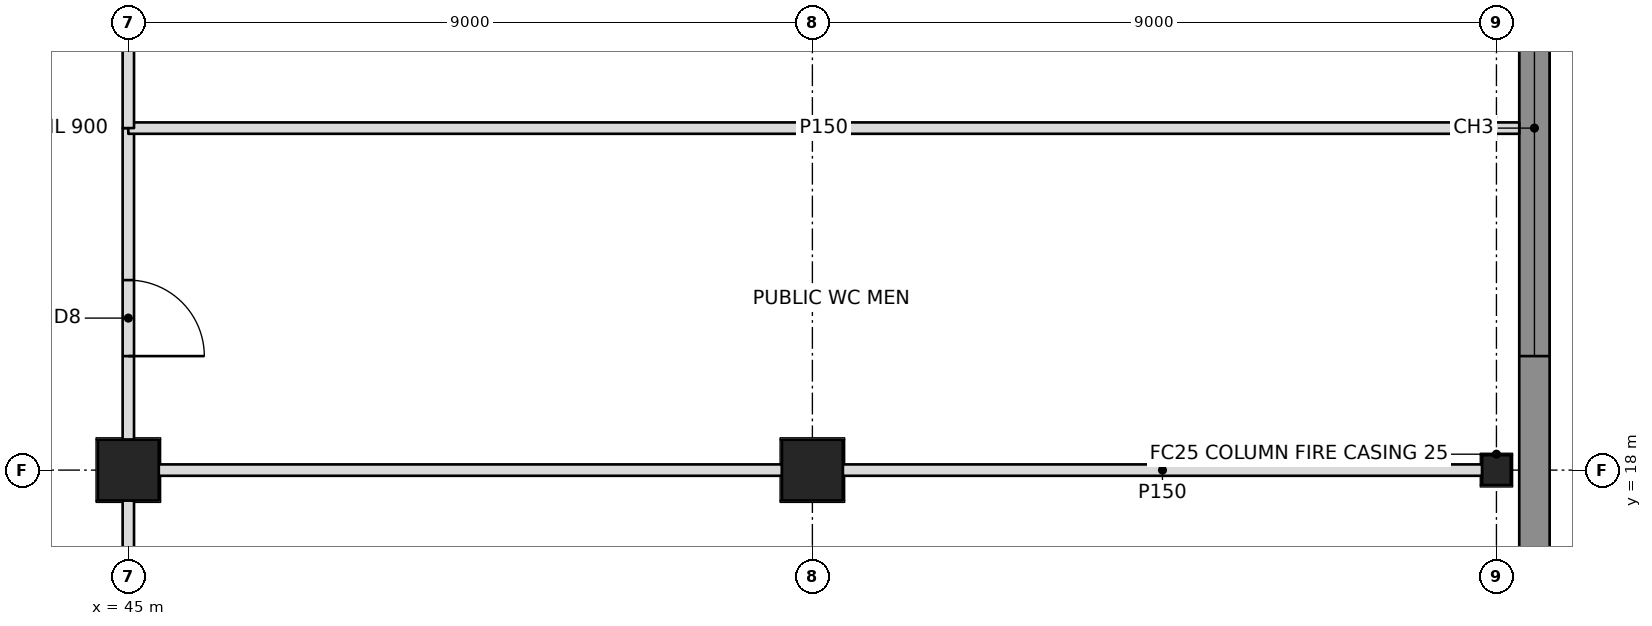
"""IFC4 building model, lengths in metres.
Left out: names, types, materials, properties, quantities, classifications, styles, units other than length and angle.
Written with IfcOpenShell. Run it as: python <this file> out.ifc"""

import sys

from ifc_helpers import new_model, si_unit, direction, frame, frame_2d, origin, origin_2d, place, context, subcontext, project, spatial, rectangle, hollow_rectangle, i_section, extrude, element, fill, save


model = new_model("IFC4")
c1 = context("Model", 3, precision=1e-05, world=origin(), true_north=direction((0.0, 1.0)))
c2 = subcontext(c1, "Body", "Model", "MODEL_VIEW")
j1 = project(units=[si_unit("LENGTHUNIT", "METRE"), si_unit("PLANEANGLEUNIT", "RADIAN")], contexts=[c1])
p1 = place(None, origin())
s1 = spatial("IfcSite", under=j1, at=p1, CompositionType="ELEMENT")
p2 = place(p1, origin())
s2 = spatial("IfcBuilding", under=s1, at=p2, CompositionType="ELEMENT")
p3 = place(p2, frame((0.0, 0.0, 11.0)))
s3 = spatial("IfcBuildingStorey", under=s2, at=p3, CompositionType="ELEMENT", Elevation=11.0)
for number, where, z_axis, x_axis in (
    (1, (45.0, 18.0, 0.0), (0.0, 0.0, 1.0), (0.0, 1.0, 0.0)),
    (2, (54.0, 18.0, 0.0), (0.0, 0.0, 1.0), (0.0, 1.0, 0.0)),
):
    element("IfcColumn", number, at=place(p3, frame(where, z_axis=z_axis, x_axis=x_axis)), inside=s3, PredefinedType="COLUMN", context=c2, shape_type="SweptSolid", body=[
        extrude(hollow_rectangle(XDim=0.8, YDim=0.8, WallThickness=0.1, at=origin_2d()), origin(), (0.0, 0.0, 1.0), 5.0),
    ])
p4 = place(p3, frame((63.0, 18.0, 0.0), z_axis=(0.0, 0.0, 1.0), x_axis=(0.0, 1.0, 0.0)))
e3 = element("IfcColumn", 3, at=p4, inside=s3, PredefinedType="COLUMN", context=c2, shape_type="SweptSolid", body=[
    extrude(i_section(OverallWidth=0.394, OverallDepth=0.376, WebThickness=0.017, FlangeThickness=0.028, at=origin_2d()), origin(), (0.0, 0.0, 1.0), 5.0),
])
p5 = place(p3, frame((63.5, -27.5, 0.0), z_axis=(0.0, 0.0, 1.0), x_axis=(0.0, 1.0, 0.0)))
e4 = element("IfcWall", 4, at=p5, inside=s3, PredefinedType="SOLIDWALL", context=c2, shape_type="SweptSolid", body=[
    extrude(rectangle(XDim=73.0, YDim=0.4, at=frame_2d((36.5, 0.0))), origin(), (0.0, 0.0, 1.0), 4.75),
])
p6 = place(p5, frame((2.0, 0.0, 0.9)))
e5 = element("IfcOpeningElement", 5, at=p6, cuts=e4, PredefinedType="OPENING", context=c2, shape_type="SweptSolid", body=[
    extrude(rectangle(XDim=6.0, YDim=2.6, at=frame_2d((3.0, 1.3))), frame((0.0, 0.21, 0.0), z_axis=(0.0, -1.0, 0.0), x_axis=(1.0, 0.0, 0.0)), (0.0, 0.0, 1.0), 0.42),
])
p7 = place(p5, frame((11.0, 0.0, 0.9)))
e6 = element("IfcOpeningElement", 6, at=p7, cuts=e4, PredefinedType="OPENING", context=c2, shape_type="SweptSolid", body=[
    extrude(rectangle(XDim=6.0, YDim=2.6, at=frame_2d((3.0, 1.3))), frame((0.0, 0.21, 0.0), z_axis=(0.0, -1.0, 0.0), x_axis=(1.0, 0.0, 0.0)), (0.0, 0.0, 1.0), 0.42),
])
p8 = place(p5, frame((20.0, 0.0, 0.9)))
e7 = element("IfcOpeningElement", 7, at=p8, cuts=e4, PredefinedType="OPENING", context=c2, shape_type="SweptSolid", body=[
    extrude(rectangle(XDim=6.0, YDim=2.6, at=frame_2d((3.0, 1.3))), frame((0.0, 0.21, 0.0), z_axis=(0.0, -1.0, 0.0), x_axis=(1.0, 0.0, 0.0)), (0.0, 0.0, 1.0), 0.42),
])
p9 = place(p5, frame((29.0, 0.0, 0.9)))
e8 = element("IfcOpeningElement", 8, at=p9, cuts=e4, PredefinedType="OPENING", context=c2, shape_type="SweptSolid", body=[
    extrude(rectangle(XDim=6.0, YDim=2.6, at=frame_2d((3.0, 1.3))), frame((0.0, 0.21, 0.0), z_axis=(0.0, -1.0, 0.0), x_axis=(1.0, 0.0, 0.0)), (0.0, 0.0, 1.0), 0.42),
])
p10 = place(p5, frame((38.0, 0.0, 0.9)))
e9 = element("IfcOpeningElement", 9, at=p10, cuts=e4, PredefinedType="OPENING", context=c2, shape_type="SweptSolid", body=[
    extrude(rectangle(XDim=6.0, YDim=2.6, at=frame_2d((3.0, 1.3))), frame((0.0, 0.21, 0.0), z_axis=(0.0, -1.0, 0.0), x_axis=(1.0, 0.0, 0.0)), (0.0, 0.0, 1.0), 0.42),
])
p11 = place(p5, frame((47.0, 0.0, 0.9)))
e10 = element("IfcOpeningElement", 10, at=p11, cuts=e4, PredefinedType="OPENING", context=c2, shape_type="SweptSolid", body=[
    extrude(rectangle(XDim=6.0, YDim=2.6, at=frame_2d((3.0, 1.3))), frame((0.0, 0.21, 0.0), z_axis=(0.0, -1.0, 0.0), x_axis=(1.0, 0.0, 0.0)), (0.0, 0.0, 1.0), 0.42),
])
p12 = place(p5, frame((56.0, 0.0, 0.9)))
e11 = element("IfcOpeningElement", 11, at=p12, cuts=e4, PredefinedType="OPENING", context=c2, shape_type="SweptSolid", body=[
    extrude(rectangle(XDim=6.0, YDim=2.6, at=frame_2d((3.0, 1.3))), frame((0.0, 0.21, 0.0), z_axis=(0.0, -1.0, 0.0), x_axis=(1.0, 0.0, 0.0)), (0.0, 0.0, 1.0), 0.42),
])
p13 = place(p5, frame((65.0, 0.0, 0.9)))
e12 = element("IfcOpeningElement", 12, at=p13, cuts=e4, PredefinedType="OPENING", context=c2, shape_type="SweptSolid", body=[
    extrude(rectangle(XDim=6.0, YDim=2.6, at=frame_2d((3.0, 1.3))), frame((0.0, 0.21, 0.0), z_axis=(0.0, -1.0, 0.0), x_axis=(1.0, 0.0, 0.0)), (0.0, 0.0, 1.0), 0.42),
])
for number, where, z_axis, x_axis in (
    (13, (45.0, 9.4, 0.0), (0.0, 0.0, 1.0), (0.0, 1.0, 0.0)),
    (14, (45.4, 18.0, 0.0), (0.0, 0.0, 1.0), (1.0, 0.0, 0.0)),
):
    element("IfcWall", number, at=place(p3, frame(where, z_axis=z_axis, x_axis=x_axis)), inside=s3, PredefinedType="PARTITIONING", context=c2, shape_type="SweptSolid", body=[
        extrude(rectangle(XDim=8.2, YDim=0.15, at=frame_2d((4.1, 0.0))), origin(), (0.0, 0.0, 1.0), 3.892),
    ])
p14 = place(p3, frame((54.4, 18.0, 0.0), z_axis=(0.0, 0.0, 1.0), x_axis=(1.0, 0.0, 0.0)))
e15 = element("IfcWall", 15, at=p14, inside=s3, PredefinedType="PARTITIONING", context=c2, shape_type="SweptSolid", body=[
    extrude(rectangle(XDim=8.412, YDim=0.15, at=frame_2d((4.206, 0.0))), origin(), (0.0, 0.0, 1.0), 3.892),
])
p15 = place(p3, frame((45.0, 18.4, 0.0), z_axis=(0.0, 0.0, 1.0), x_axis=(0.0, 1.0, 0.0)))
e16 = element("IfcWall", 16, at=p15, inside=s3, PredefinedType="PARTITIONING", context=c2, shape_type="SweptSolid", body=[
    extrude(rectangle(XDim=4.1, YDim=0.15, at=frame_2d((2.05, 0.0))), origin(), (0.0, 0.0, 1.0), 3.892),
])
p16 = place(p15, frame((1.1, 0.0, 0.0)))
e17 = element("IfcOpeningElement", 17, at=p16, cuts=e16, PredefinedType="OPENING", context=c2, shape_type="SweptSolid", body=[
    extrude(rectangle(XDim=1.0, YDim=2.1, at=frame_2d((0.5, 1.05))), frame((0.0, 0.085, 0.0), z_axis=(0.0, -1.0, 0.0), x_axis=(1.0, 0.0, 0.0)), (0.0, 0.0, 1.0), 0.17),
])
p17 = place(p3, frame((45.0, 22.5, 0.0), z_axis=(0.0, 0.0, 1.0), x_axis=(1.0, 0.0, 0.0)))
e18 = element("IfcWall", 18, at=p17, inside=s3, PredefinedType="PARTITIONING", context=c2, shape_type="SweptSolid", body=[
    extrude(rectangle(XDim=18.3, YDim=0.15, at=frame_2d((9.15, 0.0))), origin(), (0.0, 0.0, 1.0), 3.891),
])
p18 = place(p3, frame((45.0, 22.5, 0.0), z_axis=(0.0, 0.0, 1.0), x_axis=(0.0, 1.0, 0.0)))
e19 = element("IfcWall", 19, at=p18, inside=s3, PredefinedType="PARTITIONING", context=c2, shape_type="SweptSolid", body=[
    extrude(rectangle(XDim=4.1, YDim=0.15, at=frame_2d((2.05, 0.0))), origin(), (0.0, 0.0, 1.0), 3.892),
])
p19 = place(p18, frame((1.5, 0.0, 0.0)))
e20 = element("IfcOpeningElement", 20, at=p19, cuts=e19, PredefinedType="OPENING", context=c2, shape_type="SweptSolid", body=[
    extrude(rectangle(XDim=1.0, YDim=2.1, at=frame_2d((0.5, 1.05))), frame((0.0, 0.085, 0.0), z_axis=(0.0, -1.0, 0.0), x_axis=(1.0, 0.0, 0.0)), (0.0, 0.0, 1.0), 0.17),
])
p20 = place(p11, origin())
e21 = element("IfcWindow", 21, at=p20, inside=s3, PartitioningType="TRIPLE_PANEL_VERTICAL", PredefinedType="WINDOW", context=c2, shape_type="SweptSolid", body=[
    extrude(rectangle(XDim=6.0, YDim=2.6, at=frame_2d((3.0, 1.3))), frame((0.0, 0.03, 0.0), z_axis=(0.0, -1.0, 0.0), x_axis=(1.0, 0.0, 0.0)), (0.0, 0.0, 1.0), 0.06),
])
fill(e10, e21)
p21 = place(p16, frame((1.0, 0.0, 0.0), z_axis=(0.0, 0.0, 1.0), x_axis=(-1.0, 0.0, 0.0)))
e22 = element("IfcDoor", 22, at=p21, inside=s3, OperationType="SINGLE_SWING_RIGHT", PredefinedType="DOOR", context=c2, shape_type="SweptSolid", body=[
    extrude(rectangle(XDim=1.0, YDim=2.1, at=frame_2d((0.5, 1.05))), frame((0.0, 0.025, 0.0), z_axis=(0.0, -1.0, 0.0), x_axis=(1.0, 0.0, 0.0)), (0.0, 0.0, 1.0), 0.05),
])
fill(e17, e22)
save(model, sys.argv[1])
